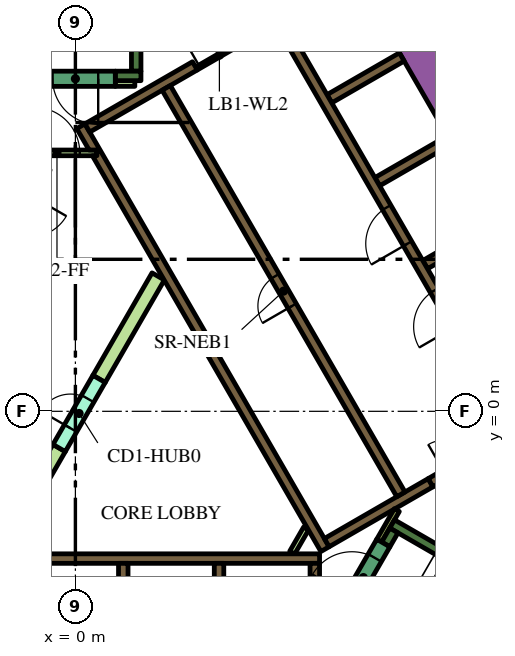
"""IFC4 building model, lengths in metres.
Left out: names, types, materials, properties, quantities, classifications, styles, units other than length and angle.
Written with IfcOpenShell. Run it as: python <this file> out.ifc"""

import sys

from ifc_helpers import new_model, si_unit, direction, frame, frame_2d, origin, place, context, subcontext, project, spatial, polyline, rectangle, outline, extrude, element, fill, save


model = new_model("IFC4")
c1 = context("Model", 3, precision=1e-05, world=origin(), true_north=direction((0.0, 1.0)))
c2 = subcontext(c1, "Body", "Model", "MODEL_VIEW")
j1 = project(units=[si_unit("LENGTHUNIT", "METRE"), si_unit("PLANEANGLEUNIT", "RADIAN")], contexts=[c1])
p1 = place(None, origin())
s1 = spatial("IfcSite", under=j1, at=p1, CompositionType="ELEMENT")
p2 = place(p1, origin())
s2 = spatial("IfcBuilding", under=s1, at=p2, CompositionType="ELEMENT")
p3 = place(p2, frame((0.0, 0.0, 39.3)))
s3 = spatial("IfcBuildingStorey", under=s2, at=p3, CompositionType="ELEMENT", Elevation=39.3)
p4 = place(p3, frame((6.711, 13.476, 0.0), z_axis=(0.0, 0.0, 1.0), x_axis=(0.500002723396, -0.866023831425, 0.0)))
e1 = element("IfcWall", 1, at=p4, inside=s3, PredefinedType="SOLIDWALL", context=c2, shape_type="SweptSolid", body=[
    extrude(rectangle(XDim=20.334, YDim=0.9, at=frame_2d((10.167, 0.0))), origin(), (0.0, 0.0, 1.0), 3.9),
])
p5 = place(p3, frame((8.334, -2.964, 0.0), z_axis=(0.0, 0.0, 1.0), x_axis=(0.866016039709, -0.500016218704, 0.0)))
e2 = element("IfcWall", 2, at=p5, inside=s3, PredefinedType="SOLIDWALL", context=c2, shape_type="SweptSolid", body=[
    extrude(rectangle(XDim=7.05, YDim=0.25, at=frame_2d((3.525, 0.0))), origin(), (0.0, 0.0, 1.0), 3.9),
])
p6 = place(p3, frame((8.168, -3.503, 0.0), z_axis=(0.0, 0.0, 1.0), x_axis=(0.49972245349, 0.866185586049, 0.0)))
e3 = element("IfcWall", 3, at=p6, inside=s3, PredefinedType="SOLIDWALL", context=c2, shape_type="SweptSolid", body=[
    extrude(rectangle(XDim=0.425, YDim=0.25, at=frame_2d((0.212, 0.0))), origin(), (0.0, 0.0, 1.0), 3.9),
])
p7 = place(p3, frame((1.6, 8.95, 0.0), z_axis=(0.0, 0.0, 1.0), x_axis=(0.0, 1.0, 0.0)))
e4 = element("IfcWall", 4, at=p7, inside=s3, PredefinedType="SOLIDWALL", context=c2, shape_type="SweptSolid", body=[
    extrude(rectangle(XDim=6.8, YDim=0.25, at=frame_2d((3.4, 0.0))), origin(), (0.0, 0.0, 1.0), 3.9),
])
p8 = place(p3, frame((1.05, 8.825, 0.0), z_axis=(0.0, 0.0, 1.0), x_axis=(1.0, 0.0, 0.0)))
e5 = element("IfcWall", 5, at=p8, inside=s3, PredefinedType="SOLIDWALL", context=c2, shape_type="SweptSolid", body=[
    extrude(rectangle(XDim=0.675, YDim=0.25, at=frame_2d((0.337, 0.0))), origin(), (0.0, 0.0, 1.0), 3.9),
])
p9 = place(p3, frame((-5.545, -3.875, 0.0), z_axis=(0.0, 0.0, 1.0), x_axis=(1.0, 0.0, 0.0)))
e6 = element("IfcWall", 6, at=p9, inside=s3, PredefinedType="SOLIDWALL", context=c2, shape_type="SweptSolid", body=[
    extrude(rectangle(XDim=11.97, YDim=0.25, at=frame_2d((5.985, 0.0))), origin(), (0.0, 0.0, 1.0), 3.9),
])
p10 = place(p3, frame((6.3, -7.268, 0.0), z_axis=(0.0, 0.0, 1.0), x_axis=(0.0, 1.0, 0.0)))
e7 = element("IfcWall", 7, at=p10, inside=s3, PredefinedType="SOLIDWALL", context=c2, shape_type="SweptSolid", body=[
    extrude(rectangle(XDim=3.268, YDim=0.25, at=frame_2d((1.634, 0.0))), origin(), (0.0, 0.0, 1.0), 3.9),
])
for number, where, z_axis, x_axis in (
    (8, (3.78, -4.0, 0.0), (0.0, 0.0, 1.0), (0.0, -1.0, 0.0)),
    (9, (1.26, -4.0, 0.0), (0.0, 0.0, 1.0), (0.0, -1.0, 0.0)),
):
    element("IfcWall", number, at=place(p3, frame(where, z_axis=z_axis, x_axis=x_axis)), inside=s3, PredefinedType="SOLIDWALL", context=c2, shape_type="SweptSolid", body=[
        extrude(rectangle(XDim=2.2, YDim=0.25, at=frame_2d((1.1, 0.0))), origin(), (0.0, 0.0, 1.0), 3.9),
    ])
p11 = place(p3, origin())
e10 = element("IfcWall", 10, at=p11, inside=s3, PredefinedType="SOLIDWALL", context=c2, shape_type="SweptSolid", body=[
    extrude(outline(polyline([(0.566, 6.725), (0.566, 6.875), (0.566, 6.875), (0.565, 6.875), (0.361, 6.875), (0.035, 7.439), (0.252, 7.564), (0.377, 7.348), (6.552, -3.348), (6.677, -3.564), (6.46, -3.689), (0.448, 6.725), (0.565, 6.725), (0.566, 6.725), (0.566, 6.725)])), origin(), (0.0, 0.0, 1.0), 3.9),
])
p12 = place(p3, frame((0.314, 7.456, 0.0), z_axis=(0.0, 0.0, 1.0), x_axis=(0.866013897511, 0.50001992892, 0.0)))
e11 = element("IfcWall", 11, at=p12, inside=s3, PredefinedType="SOLIDWALL", context=c2, shape_type="SweptSolid", body=[
    extrude(rectangle(XDim=3.268, YDim=0.25, at=frame_2d((1.634, 0.0))), origin(), (0.0, 0.0, 1.0), 3.9),
])
p13 = place(p3, frame((6.614, -3.456, 0.0), z_axis=(0.0, 0.0, 1.0), x_axis=(0.86602447079, 0.500001615989, 0.0)))
e12 = element("IfcWall", 12, at=p13, inside=s3, PredefinedType="SOLIDWALL", context=c2, shape_type="SweptSolid", body=[
    extrude(rectangle(XDim=3.154, YDim=0.25, at=frame_2d((1.577, 0.0))), origin(), (0.0, 0.0, 1.0), 3.9),
])
for number, where, z_axis, x_axis in (
    (13, (6.684, 8.224, 0.0), (0.0, 0.0, 1.0), (0.866, 0.5, 0.0)),
    (14, (7.944, 6.041, 0.0), (0.0, 0.0, 1.0), (0.866, 0.5, 0.0)),
    (15, (9.204, 3.859, 0.0), (0.0, 0.0, 1.0), (0.866, 0.5, 0.0)),
):
    element("IfcWall", number, at=place(p3, frame(where, z_axis=z_axis, x_axis=x_axis)), inside=s3, PredefinedType="SOLIDWALL", context=c2, shape_type="SweptSolid", body=[
        extrude(rectangle(XDim=2.2, YDim=0.25, at=frame_2d((1.1, 0.0))), origin(), (0.0, 0.0, 1.0), 3.9),
    ])
p14 = place(p3, frame((5.705, -3.718, 0.0), z_axis=(0.0, 0.0, 1.0), x_axis=(0.499962090823, 0.866047289552, 0.0)))
e16 = element("IfcWall", 16, at=p14, inside=s3, PredefinedType="PARTITIONING", context=c2, shape_type="SweptSolid", body=[
    extrude(rectangle(XDim=0.735, YDim=0.15, at=frame_2d((0.367, 0.0))), origin(), (0.0, 0.0, 1.0), 2.75),
])
p15 = place(p3, frame((8.459, -2.599, 0.0), z_axis=(0.0, 0.0, 1.0), x_axis=(-0.500041054325, -0.866001699761, 0.0)))
e17 = element("IfcWall", 17, at=p15, inside=s3, PredefinedType="PARTITIONING", context=c2, shape_type="SweptSolid", body=[
    extrude(rectangle(XDim=0.929, YDim=0.15, at=frame_2d((0.464, 0.0))), origin(), (0.0, 0.0, 1.0), 3.9),
])
e18 = element("IfcWall", 18, at=p11, inside=s3, PredefinedType="PARTITIONING", context=c2, shape_type="SweptSolid", body=[
    extrude(outline(polyline([(-0.59, -0.872), (-0.265, -1.059), (-1.822, -3.756), (-2.147, -3.568), (-0.59, -0.872)])), origin(), (0.0, 0.0, 1.0), 2.75),
])
e19 = element("IfcWall", 19, at=p11, inside=s3, PredefinedType="PARTITIONING", context=c2, shape_type="SweptSolid", body=[
    extrude(outline(polyline([(2.017, 3.643), (2.342, 3.456), (0.785, 0.76), (0.46, 0.947), (2.017, 3.643)])), origin(), (0.0, 0.0, 1.0), 2.75),
])
p16 = place(p3, frame((1.05, 8.625, 0.0), z_axis=(0.0, 0.0, 1.0), x_axis=(1.0, 0.0, 0.0)))
e20 = element("IfcWall", 20, at=p16, inside=s3, PredefinedType="PARTITIONING", context=c2, shape_type="SweptSolid", body=[
    extrude(rectangle(XDim=0.514, YDim=0.15, at=frame_2d((0.257, 0.0))), origin(), (0.0, 0.0, 1.0), 2.75),
])
p17 = place(p3, frame((11.553, -0.46, 0.0), z_axis=(0.0, 0.0, 1.0), x_axis=(-0.500006514828, 0.866021642414, 0.0)))
e21 = element("IfcWall", 21, at=p17, inside=s3, PredefinedType="SOLIDWALL", context=c2, shape_type="SweptSolid", body=[
    extrude(rectangle(XDim=12.35, YDim=0.25, at=frame_2d((6.175, 0.0))), origin(), (0.0, 0.0, 1.0), 3.9),
])
p18 = place(p17, frame((0.585, 0.0, 0.0)))
e22 = element("IfcOpeningElement", 22, at=p18, cuts=e21, PredefinedType="OPENING", context=c2, shape_type="SweptSolid", body=[
    extrude(rectangle(XDim=1.1, YDim=2.1, at=frame_2d((0.55, 1.05))), frame((0.0, 0.135, 0.0), z_axis=(0.0, -1.0, 0.0), x_axis=(1.0, 0.0, 0.0)), (0.0, 0.0, 1.0), 0.27),
])
p19 = place(p17, frame((3.105, 0.0, 0.0)))
e23 = element("IfcOpeningElement", 23, at=p19, cuts=e21, PredefinedType="OPENING", context=c2, shape_type="SweptSolid", body=[
    extrude(rectangle(XDim=1.1, YDim=2.1, at=frame_2d((0.55, 1.05))), frame((0.0, 0.135, 0.0), z_axis=(0.0, -1.0, 0.0), x_axis=(1.0, 0.0, 0.0)), (0.0, 0.0, 1.0), 0.27),
])
p20 = place(p17, frame((5.625, 0.0, 0.0)))
e24 = element("IfcOpeningElement", 24, at=p20, cuts=e21, PredefinedType="OPENING", context=c2, shape_type="SweptSolid", body=[
    extrude(rectangle(XDim=1.1, YDim=2.1, at=frame_2d((0.55, 1.05))), frame((0.0, 0.135, 0.0), z_axis=(0.0, -1.0, 0.0), x_axis=(1.0, 0.0, 0.0)), (0.0, 0.0, 1.0), 0.27),
])
p21 = place(p3, frame((8.565, -2.185, 0.0), z_axis=(0.0, 0.0, 1.0), x_axis=(-0.499997954832, 0.866026584559, 0.0)))
e25 = element("IfcWall", 25, at=p21, inside=s3, PredefinedType="SOLIDWALL", context=c2, shape_type="SweptSolid", body=[
    extrude(rectangle(XDim=12.35, YDim=0.25, at=frame_2d((6.175, 0.0))), origin(), (0.0, 0.0, 1.0), 3.9),
])
p22 = place(p21, frame((5.725, 0.0, 0.0)))
e26 = element("IfcOpeningElement", 26, at=p22, cuts=e25, PredefinedType="OPENING", context=c2, shape_type="SweptSolid", body=[
    extrude(rectangle(XDim=0.9, YDim=2.1, at=frame_2d((0.45, 1.05))), frame((0.0, 0.135, 0.0), z_axis=(0.0, -1.0, 0.0), x_axis=(1.0, 0.0, 0.0)), (0.0, 0.0, 1.0), 0.27),
])
p23 = place(p3, frame((7.053, -5.284, 0.0), z_axis=(0.0, 0.0, 1.0), x_axis=(0.500078061341, 0.865980330357, 0.0)))
e27 = element("IfcWall", 27, at=p23, inside=s3, PredefinedType="SOLIDWALL", context=c2, shape_type="SweptSolid", body=[
    extrude(rectangle(XDim=2.1, YDim=0.4, at=frame_2d((1.05, 0.0))), origin(), (0.0, 0.0, 1.0), 3.9),
])
p24 = place(p23, frame((0.45, 0.0, 0.0)))
e28 = element("IfcOpeningElement", 28, at=p24, cuts=e27, PredefinedType="OPENING", context=c2, shape_type="SweptSolid", body=[
    extrude(rectangle(XDim=1.2, YDim=2.1, at=frame_2d((0.6, 1.05))), frame((0.0, 0.21, 0.0), z_axis=(0.0, -1.0, 0.0), x_axis=(1.0, 0.0, 0.0)), (0.0, 0.0, 1.0), 0.42),
])
p25 = place(p3, frame((9.346, -1.879, 0.0), z_axis=(0.0, 0.0, 1.0), x_axis=(0.866047807691, 0.499961193289, 0.0)))
e29 = element("IfcWall", 29, at=p25, inside=s3, PredefinedType="SOLIDWALL", context=c2, shape_type="SweptSolid", body=[
    extrude(rectangle(XDim=1.8, YDim=0.25, at=frame_2d((0.9, 0.0))), origin(), (0.0, 0.0, 1.0), 3.9),
])
p26 = place(p25, frame((0.45, 0.0, 0.0)))
e30 = element("IfcOpeningElement", 30, at=p26, cuts=e29, PredefinedType="OPENING", context=c2, shape_type="SweptSolid", body=[
    extrude(rectangle(XDim=0.9, YDim=2.1, at=frame_2d((0.45, 1.05))), frame((0.0, 0.135, 0.0), z_axis=(0.0, -1.0, 0.0), x_axis=(1.0, 0.0, 0.0)), (0.0, 0.0, 1.0), 0.27),
])
p27 = place(p3, frame((1.05, 8.75, 0.0), z_axis=(0.0, 0.0, 1.0), x_axis=(-1.0, 0.0, 0.0)))
e31 = element("IfcWall", 31, at=p27, inside=s3, PredefinedType="SOLIDWALL", context=c2, shape_type="SweptSolid", body=[
    extrude(rectangle(XDim=2.1, YDim=0.4, at=frame_2d((1.05, 0.0))), origin(), (0.0, 0.0, 1.0), 3.9),
])
p28 = place(p27, frame((0.45, 0.0, 0.0)))
e32 = element("IfcOpeningElement", 32, at=p28, cuts=e31, PredefinedType="OPENING", context=c2, shape_type="SweptSolid", body=[
    extrude(rectangle(XDim=1.2, YDim=2.1, at=frame_2d((0.6, 1.05))), frame((0.0, 0.21, 0.0), z_axis=(0.0, -1.0, 0.0), x_axis=(1.0, 0.0, 0.0)), (0.0, 0.0, 1.0), 0.42),
])
p29 = place(p3, frame((-0.427, -0.966, 0.0), z_axis=(0.0, 0.0, 1.0), x_axis=(0.49994051562, 0.866059744384, 0.0)))
e33 = element("IfcWall", 33, at=p29, inside=s3, PredefinedType="PARTITIONING", context=c2, shape_type="SweptSolid", body=[
    extrude(rectangle(XDim=2.1, YDim=0.375, at=frame_2d((1.05, 0.0))), origin(), (0.0, 0.0, 1.0), 2.75),
])
p30 = place(p29, frame((0.6, 0.0, 0.0)))
e34 = element("IfcOpeningElement", 34, at=p30, cuts=e33, PredefinedType="OPENING", context=c2, shape_type="SweptSolid", body=[
    extrude(rectangle(XDim=0.9, YDim=2.1, at=frame_2d((0.45, 1.05))), frame((0.0, 0.198, 0.0), z_axis=(0.0, -1.0, 0.0), x_axis=(1.0, 0.0, 0.0)), (0.0, 0.0, 1.0), 0.395),
])
p31 = place(p3, frame((-1.534, 6.8, 0.0), z_axis=(0.0, 0.0, 1.0), x_axis=(1.0, 0.0, 0.0)))
e35 = element("IfcWall", 35, at=p31, inside=s3, PredefinedType="PARTITIONING", context=c2, shape_type="SweptSolid", body=[
    extrude(rectangle(XDim=2.1, YDim=0.15, at=frame_2d((1.05, 0.0))), origin(), (0.0, 0.0, 1.0), 2.75),
])
p32 = place(p31, frame((0.45, 0.0, 0.0)))
e36 = element("IfcOpeningElement", 36, at=p32, cuts=e35, PredefinedType="OPENING", context=c2, shape_type="SweptSolid", body=[
    extrude(rectangle(XDim=1.2, YDim=2.1, at=frame_2d((0.6, 1.05))), frame((0.0, 0.085, 0.0), z_axis=(0.0, -1.0, 0.0), x_axis=(1.0, 0.0, 0.0)), (0.0, 0.0, 1.0), 0.17),
])
p33 = place(p3, frame((3.183, 9.02, 0.0), z_axis=(0.0, 0.0, 1.0), x_axis=(0.866034573852, 0.49998411664, 0.0)))
e37 = element("IfcWall", 37, at=p33, inside=s3, PredefinedType="PARTITIONING", context=c2, shape_type="SweptSolid", body=[
    extrude(rectangle(XDim=1.4, YDim=0.09, at=frame_2d((0.7, 0.0))), origin(), (0.0, 0.0, 1.0), 2.75),
])
p34 = place(p33, frame((0.1, 0.0, 0.0)))
e38 = element("IfcOpeningElement", 38, at=p34, cuts=e37, PredefinedType="OPENING", context=c2, shape_type="SweptSolid", body=[
    extrude(rectangle(XDim=1.2, YDim=2.1, at=frame_2d((0.6, 1.05))), frame((0.0, 0.055, 0.0), z_axis=(0.0, -1.0, 0.0), x_axis=(1.0, 0.0, 0.0)), (0.0, 0.0, 1.0), 0.11),
])
p35 = place(p3, frame((6.163, 18.475, 0.0), z_axis=(0.0, 0.0, 1.0), x_axis=(0.500001317485, -0.866024643133, 0.0)))
e39 = element("IfcWall", 39, at=p35, inside=s3, PredefinedType="PARTITIONING", context=c2, shape_type="SweptSolid", body=[
    extrude(rectangle(XDim=25.767, YDim=0.15, at=frame_2d((12.883, 0.0))), origin(), (0.0, 0.0, 1.0), 2.75),
])
p36 = place(p35, frame((24.586, 0.0, 0.0)))
e40 = element("IfcOpeningElement", 40, at=p36, cuts=e39, PredefinedType="OPENING", context=c2, shape_type="SweptSolid", body=[
    extrude(rectangle(XDim=1.0, YDim=2.1, at=frame_2d((0.5, 1.05))), frame((0.0, 0.085, 0.0), z_axis=(0.0, -1.0, 0.0), x_axis=(1.0, 0.0, 0.0)), (0.0, 0.0, 1.0), 0.17),
])
p37 = place(p35, frame((16.196, 0.0, 0.0)))
e41 = element("IfcOpeningElement", 41, at=p37, cuts=e39, PredefinedType="OPENING", context=c2, shape_type="SweptSolid", body=[
    extrude(rectangle(XDim=1.0, YDim=2.1, at=frame_2d((0.5, 1.05))), frame((0.0, 0.085, 0.0), z_axis=(0.0, -1.0, 0.0), x_axis=(1.0, 0.0, 0.0)), (0.0, 0.0, 1.0), 0.17),
])
p38 = place(p35, frame((14.789, 0.0, 0.0)))
e42 = element("IfcOpeningElement", 42, at=p38, cuts=e39, PredefinedType="OPENING", context=c2, shape_type="SweptSolid", body=[
    extrude(rectangle(XDim=1.1, YDim=2.1, at=frame_2d((0.55, 1.05))), frame((0.0, 0.085, 0.0), z_axis=(0.0, -1.0, 0.0), x_axis=(1.0, 0.0, 0.0)), (0.0, 0.0, 1.0), 0.17),
])
p39 = place(p35, frame((3.698, 0.0, 0.0)))
e43 = element("IfcOpeningElement", 43, at=p39, cuts=e39, PredefinedType="OPENING", context=c2, shape_type="SweptSolid", body=[
    extrude(rectangle(XDim=1.0, YDim=2.1, at=frame_2d((0.5, 1.05))), frame((0.0, 0.085, 0.0), z_axis=(0.0, -1.0, 0.0), x_axis=(1.0, 0.0, 0.0)), (0.0, 0.0, 1.0), 0.17),
])
p40 = place(p35, frame((2.391, 0.0, 0.0)))
e44 = element("IfcOpeningElement", 44, at=p40, cuts=e39, PredefinedType="OPENING", context=c2, shape_type="SweptSolid", body=[
    extrude(rectangle(XDim=1.0, YDim=2.1, at=frame_2d((0.5, 1.05))), frame((0.0, 0.085, 0.0), z_axis=(0.0, -1.0, 0.0), x_axis=(1.0, 0.0, 0.0)), (0.0, 0.0, 1.0), 0.17),
])
p41 = place(p19, origin())
e45 = element("IfcDoor", 45, at=p41, inside=s3, OperationType="DOUBLE_DOOR_SLIDING", PredefinedType="DOOR", context=c2, shape_type="SweptSolid", body=[
    extrude(rectangle(XDim=1.1, YDim=2.1, at=frame_2d((0.55, 1.05))), frame((0.0, 0.025, 0.0), z_axis=(0.0, -1.0, 0.0), x_axis=(1.0, 0.0, 0.0)), (0.0, 0.0, 1.0), 0.05),
])
fill(e23, e45)
p42 = place(p20, origin())
e46 = element("IfcDoor", 46, at=p42, inside=s3, OperationType="DOUBLE_DOOR_SLIDING", PredefinedType="DOOR", context=c2, shape_type="SweptSolid", body=[
    extrude(rectangle(XDim=1.1, YDim=2.1, at=frame_2d((0.55, 1.05))), frame((0.0, 0.025, 0.0), z_axis=(0.0, -1.0, 0.0), x_axis=(1.0, 0.0, 0.0)), (0.0, 0.0, 1.0), 0.05),
])
fill(e24, e46)
p43 = place(p22, origin())
e47 = element("IfcDoor", 47, at=p43, inside=s3, OperationType="SINGLE_SWING_LEFT", PredefinedType="DOOR", context=c2, shape_type="SweptSolid", body=[
    extrude(rectangle(XDim=0.9, YDim=2.1, at=frame_2d((0.45, 1.05))), frame((0.0, 0.025, 0.0), z_axis=(0.0, -1.0, 0.0), x_axis=(1.0, 0.0, 0.0)), (0.0, 0.0, 1.0), 0.05),
])
fill(e26, e47)
p44 = place(p24, origin())
e48 = element("IfcDoor", 48, at=p44, inside=s3, OperationType="SINGLE_SWING_LEFT", PredefinedType="DOOR", context=c2, shape_type="SweptSolid", body=[
    extrude(rectangle(XDim=1.2, YDim=2.1, at=frame_2d((0.6, 1.05))), frame((0.0, 0.025, 0.0), z_axis=(0.0, -1.0, 0.0), x_axis=(1.0, 0.0, 0.0)), (0.0, 0.0, 1.0), 0.05),
])
fill(e28, e48)
p45 = place(p28, origin())
e49 = element("IfcDoor", 49, at=p45, inside=s3, OperationType="SINGLE_SWING_LEFT", PredefinedType="DOOR", context=c2, shape_type="SweptSolid", body=[
    extrude(rectangle(XDim=1.2, YDim=2.1, at=frame_2d((0.6, 1.05))), frame((0.0, 0.025, 0.0), z_axis=(0.0, -1.0, 0.0), x_axis=(1.0, 0.0, 0.0)), (0.0, 0.0, 1.0), 0.05),
])
fill(e32, e49)
p46 = place(p30, origin())
e50 = element("IfcDoor", 50, at=p46, inside=s3, OperationType="SINGLE_SWING_LEFT", PredefinedType="DOOR", context=c2, shape_type="SweptSolid", body=[
    extrude(rectangle(XDim=0.9, YDim=2.1, at=frame_2d((0.45, 1.05))), frame((0.0, 0.025, 0.0), z_axis=(0.0, -1.0, 0.0), x_axis=(1.0, 0.0, 0.0)), (0.0, 0.0, 1.0), 0.05),
])
fill(e34, e50)
p47 = place(p32, origin())
e51 = element("IfcDoor", 51, at=p47, inside=s3, OperationType="SINGLE_SWING_LEFT", PredefinedType="DOOR", context=c2, shape_type="SweptSolid", body=[
    extrude(rectangle(XDim=1.2, YDim=2.1, at=frame_2d((0.6, 1.05))), frame((0.0, 0.025, 0.0), z_axis=(0.0, -1.0, 0.0), x_axis=(1.0, 0.0, 0.0)), (0.0, 0.0, 1.0), 0.05),
])
fill(e36, e51)
p48 = place(p34, origin())
e52 = element("IfcDoor", 52, at=p48, inside=s3, OperationType="SINGLE_SWING_LEFT", PredefinedType="DOOR", context=c2, shape_type="SweptSolid", body=[
    extrude(rectangle(XDim=1.2, YDim=2.1, at=frame_2d((0.6, 1.05))), frame((0.0, 0.025, 0.0), z_axis=(0.0, -1.0, 0.0), x_axis=(1.0, 0.0, 0.0)), (0.0, 0.0, 1.0), 0.05),
])
fill(e38, e52)
save(model, sys.argv[1])
